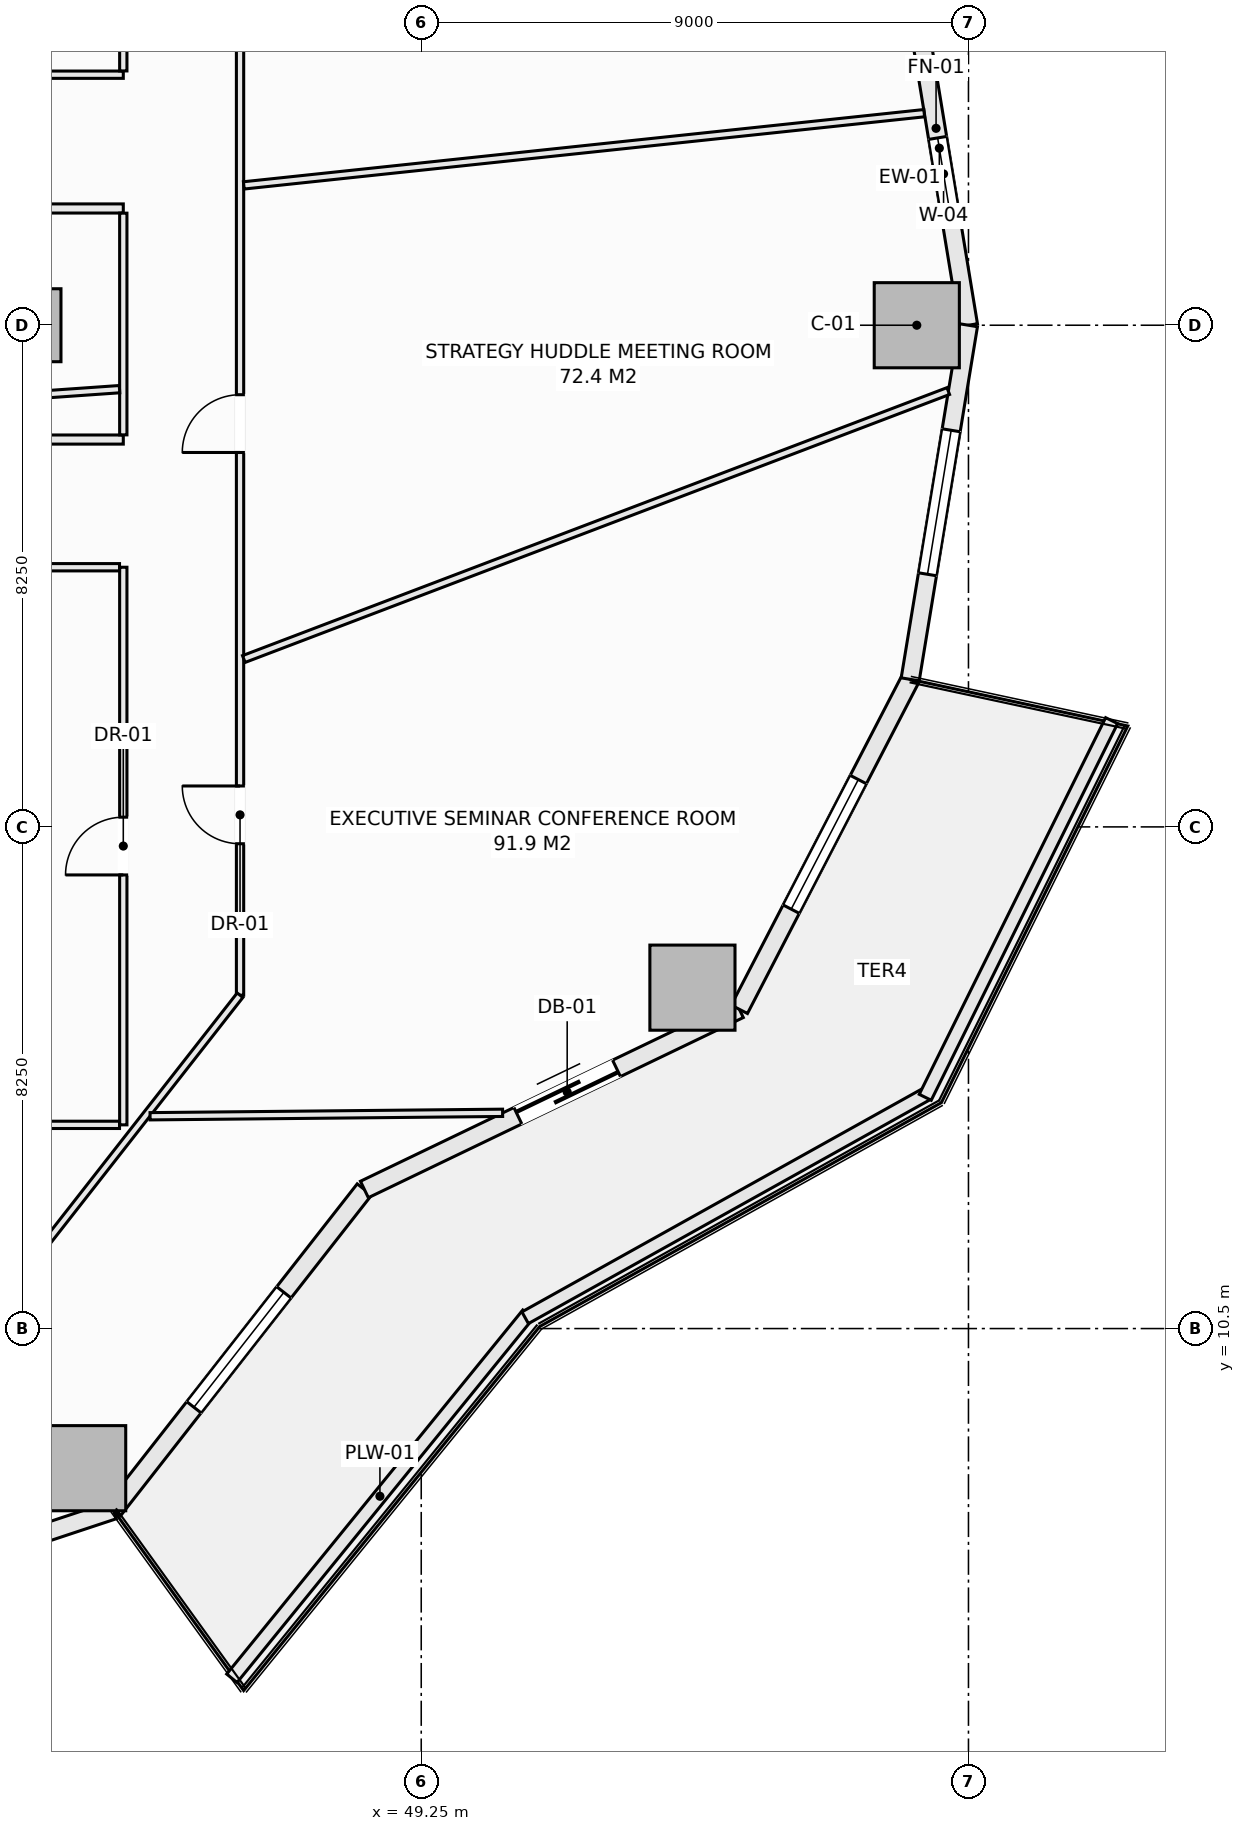
"""IFC4 building model, lengths in metres.
Left out: names, types, materials, properties, quantities, classifications, styles, units other than length and angle.
Written with IfcOpenShell. Run it as: python <this file> out.ifc"""

import sys

from ifc_helpers import new_model, si_unit, direction, frame, frame_2d, origin, origin_2d, place, context, subcontext, project, spatial, rectangle, extrude, element, fill, save


model = new_model("IFC4")
c1 = context("Model", 3, precision=1e-05, world=origin(), true_north=direction((0.0, 1.0)))
c2 = subcontext(c1, "Body", "Model", "MODEL_VIEW")
j1 = project(units=[si_unit("LENGTHUNIT", "METRE"), si_unit("PLANEANGLEUNIT", "RADIAN")], contexts=[c1])
p1 = place(None, origin())
s1 = spatial("IfcSite", under=j1, at=p1, CompositionType="ELEMENT")
p2 = place(p1, origin())
s2 = spatial("IfcBuilding", under=s1, at=p2, CompositionType="ELEMENT")
p3 = place(p2, frame((0.0, 0.0, 41.9)))
s3 = spatial("IfcBuildingStorey", under=s2, at=p3, CompositionType="ELEMENT", Elevation=41.9)
for number, where, z_axis, x_axis in (
    (1, (57.4, 27.0, -0.28), (0.0, 0.0, 1.0), (1.0, 0.0, 0.0)),
    (2, (43.69, 8.204, -0.28), (0.0, 0.0, 1.0), (1.0, 0.0, 0.0)),
    (3, (53.71, 16.106, -0.28), (0.0, 0.0, 1.0), (1.0, 0.0, 0.0)),
):
    element("IfcColumn", number, at=place(p3, frame(where, z_axis=z_axis, x_axis=x_axis)), inside=s3, PredefinedType="COLUMN", context=c2, shape_type="SweptSolid", body=[
        extrude(rectangle(XDim=1.4, YDim=1.4, at=origin_2d()), origin(), (0.0, 0.0, 1.0), 3.85),
    ])
p4 = place(p3, frame((42.725, 27.0, -0.28), z_axis=(0.0, 0.0, 1.0), x_axis=(1.0, 0.0, 0.0)))
e4 = element("IfcColumn", 4, at=p4, inside=s3, PredefinedType="COLUMN", context=c2, shape_type="SweptSolid", body=[
    extrude(rectangle(XDim=1.2, YDim=1.2, at=origin_2d()), origin(), (0.0, 0.0, 1.0), 3.85),
])
p5 = place(p3, frame((57.292, 32.823, 0.0), z_axis=(0.0, 0.0, 1.0), x_axis=(0.162366057843, -0.98673059305, 0.0)))
e5 = element("IfcWall", 5, at=p5, inside=s3, PredefinedType="SOLIDWALL", context=c2, shape_type="SweptSolid", body=[
    extrude(rectangle(XDim=5.902, YDim=0.3, at=frame_2d((2.951, 0.0))), origin(), (0.0, 0.0, 1.0), 3.093),
])
p6 = place(p5, frame((2.78, 0.0, 0.72)))
e6 = element("IfcOpeningElement", 6, at=p6, cuts=e5, PredefinedType="OPENING", context=c2, shape_type="SweptSolid", body=[
    extrude(rectangle(XDim=1.2, YDim=1.65, at=frame_2d((0.6, 0.825))), frame((0.0, 0.16, 0.0), z_axis=(0.0, -1.0, 0.0), x_axis=(1.0, 0.0, 0.0)), (0.0, 0.0, 1.0), 0.32),
])
p7 = place(p3, frame((37.404, 5.267, 0.0), z_axis=(0.0, 0.0, 1.0), x_axis=(0.949238715533, 0.31455661006, 0.0)))
e7 = element("IfcWall", 7, at=p7, inside=s3, PredefinedType="SOLIDWALL", context=c2, shape_type="SweptSolid", body=[
    extrude(rectangle(XDim=7.146, YDim=0.3, at=frame_2d((3.573, 0.0))), origin(), (0.0, 0.0, 1.0), 3.093),
])
p8 = place(p7, frame((2.373, 0.0, 0.85)))
e8 = element("IfcOpeningElement", 8, at=p8, cuts=e7, PredefinedType="OPENING", context=c2, shape_type="SweptSolid", body=[
    extrude(rectangle(XDim=2.4, YDim=1.9, at=frame_2d((1.2, 0.95))), frame((0.0, 0.16, 0.0), z_axis=(0.0, -1.0, 0.0), x_axis=(1.0, 0.0, 0.0)), (0.0, 0.0, 1.0), 0.32),
])
p9 = place(p3, frame((44.188, 7.514, 0.0), z_axis=(0.0, 0.0, 1.0), x_axis=(0.616421309777, 0.787416515482, 0.0)))
e9 = element("IfcWall", 9, at=p9, inside=s3, PredefinedType="SOLIDWALL", context=c2, shape_type="SweptSolid", body=[
    extrude(rectangle(XDim=6.696, YDim=0.3, at=frame_2d((3.348, 0.0))), origin(), (0.0, 0.0, 1.0), 3.093),
])
p10 = place(p9, frame((2.148, 0.0, 0.85)))
e10 = element("IfcOpeningElement", 10, at=p10, cuts=e9, PredefinedType="OPENING", context=c2, shape_type="SweptSolid", body=[
    extrude(rectangle(XDim=2.4, YDim=1.9, at=frame_2d((1.2, 0.95))), frame((0.0, 0.16, 0.0), z_axis=(0.0, -1.0, 0.0), x_axis=(1.0, 0.0, 0.0)), (0.0, 0.0, 1.0), 0.32),
])
p11 = place(p3, frame((48.315, 12.787, 0.0), z_axis=(0.0, 0.0, 1.0), x_axis=(0.901360393999, 0.433069786673, 0.0)))
e11 = element("IfcWall", 11, at=p11, inside=s3, PredefinedType="SOLIDWALL", context=c2, shape_type="SweptSolid", body=[
    extrude(rectangle(XDim=6.842, YDim=0.3, at=frame_2d((3.421, 0.0))), origin(), (0.0, 0.0, 1.0), 3.093),
])
p12 = place(p11, frame((2.8, 0.0, 0.0)))
e12 = element("IfcOpeningElement", 12, at=p12, cuts=e11, PredefinedType="OPENING", context=c2, shape_type="SweptSolid", body=[
    extrude(rectangle(XDim=1.8, YDim=2.25, at=frame_2d((0.9, 1.125))), frame((0.0, 0.16, 0.0), z_axis=(0.0, -1.0, 0.0), x_axis=(1.0, 0.0, 0.0)), (0.0, 0.0, 1.0), 0.32),
])
p13 = place(p3, frame((54.482, 15.75, 0.0), z_axis=(0.0, 0.0, 1.0), x_axis=(0.459809804413, 0.88801742312, 0.0)))
e13 = element("IfcWall", 13, at=p13, inside=s3, PredefinedType="SOLIDWALL", context=c2, shape_type="SweptSolid", body=[
    extrude(rectangle(XDim=6.111, YDim=0.3, at=frame_2d((3.055, 0.0))), origin(), (0.0, 0.0, 1.0), 3.093),
])
p14 = place(p13, frame((1.855, 0.0, 0.85)))
e14 = element("IfcOpeningElement", 14, at=p14, cuts=e13, PredefinedType="OPENING", context=c2, shape_type="SweptSolid", body=[
    extrude(rectangle(XDim=2.4, YDim=1.9, at=frame_2d((1.2, 0.95))), frame((0.0, 0.16, 0.0), z_axis=(0.0, -1.0, 0.0), x_axis=(1.0, 0.0, 0.0)), (0.0, 0.0, 1.0), 0.32),
])
p15 = place(p3, frame((57.292, 21.177, 0.0), z_axis=(0.0, 0.0, 1.0), x_axis=(0.162366057843, 0.98673059305, 0.0)))
e15 = element("IfcWall", 15, at=p15, inside=s3, PredefinedType="SOLIDWALL", context=c2, shape_type="SweptSolid", body=[
    extrude(rectangle(XDim=5.902, YDim=0.3, at=frame_2d((2.951, 0.0))), origin(), (0.0, 0.0, 1.0), 3.093),
])
p16 = place(p15, frame((1.751, 0.0, 0.85)))
e16 = element("IfcOpeningElement", 16, at=p16, cuts=e15, PredefinedType="OPENING", context=c2, shape_type="SweptSolid", body=[
    extrude(rectangle(XDim=2.4, YDim=1.9, at=frame_2d((1.2, 0.95))), frame((0.0, 0.16, 0.0), z_axis=(0.0, -1.0, 0.0), x_axis=(1.0, 0.0, 0.0)), (0.0, 0.0, 1.0), 0.32),
])
p17 = place(p3, frame((46.136, 4.749, 0.0), z_axis=(0.0, 0.0, 1.0), x_axis=(0.630997450658, 0.775784903993, 0.0)))
e17 = element("IfcWall", 17, at=p17, inside=s3, PredefinedType="PARAPET", context=c2, shape_type="SweptSolid", body=[
    extrude(rectangle(XDim=7.718, YDim=0.22, at=frame_2d((3.859, 0.0))), origin(), (0.0, 0.0, 1.0), 0.52),
])
p18 = place(p3, frame((50.959, 10.678, 0.0), z_axis=(0.0, 0.0, 1.0), x_axis=(0.873500119739, 0.48682393205, 0.0)))
e18 = element("IfcWall", 18, at=p18, inside=s3, PredefinedType="PARAPET", context=c2, shape_type="SweptSolid", body=[
    extrude(rectangle(XDim=7.562, YDim=0.22, at=frame_2d((3.781, 0.0))), origin(), (0.0, 0.0, 1.0), 0.52),
])
p19 = place(p3, frame((57.539, 14.303, 0.0), z_axis=(0.0, 0.0, 1.0), x_axis=(0.443578479433, 0.8962355341, 0.0)))
e19 = element("IfcWall", 19, at=p19, inside=s3, PredefinedType="PARAPET", context=c2, shape_type="SweptSolid", body=[
    extrude(rectangle(XDim=6.911, YDim=0.22, at=frame_2d((3.456, 0.0))), origin(), (0.0, 0.0, 1.0), 0.52),
])
p20 = place(p3, frame((29.78, 25.12, 0.0), z_axis=(0.0, 0.0, 1.0), x_axis=(1.0, 0.0, 0.0)))
e20 = element("IfcWall", 20, at=p20, inside=s3, PredefinedType="PARTITIONING", context=c2, shape_type="SweptSolid", body=[
    extrude(rectangle(XDim=14.57, YDim=0.15, at=frame_2d((7.285, 0.0))), origin(), (0.0, 0.0, 1.0), 3.57),
])
p21 = place(p20, frame((3.14, 0.0, 0.0)))
e21 = element("IfcOpeningElement", 21, at=p21, cuts=e20, PredefinedType="OPENING", context=c2, shape_type="SweptSolid", body=[
    extrude(rectangle(XDim=0.95, YDim=2.1, at=frame_2d((0.475, 1.05))), frame((0.0, 0.085, 0.0), z_axis=(0.0, -1.0, 0.0), x_axis=(1.0, 0.0, 0.0)), (0.0, 0.0, 1.0), 0.17),
])
p22 = place(p20, frame((7.445, 0.0, 0.0)))
e22 = element("IfcOpeningElement", 22, at=p22, cuts=e20, PredefinedType="OPENING", context=c2, shape_type="SweptSolid", body=[
    extrude(rectangle(XDim=0.95, YDim=2.1, at=frame_2d((0.475, 1.05))), frame((0.0, 0.085, 0.0), z_axis=(0.0, -1.0, 0.0), x_axis=(1.0, 0.0, 0.0)), (0.0, 0.0, 1.0), 0.17),
])
p23 = place(p3, frame((30.077, 28.92, 0.0), z_axis=(0.0, 0.0, 1.0), x_axis=(1.0, 0.0, 0.0)))
e23 = element("IfcWall", 23, at=p23, inside=s3, PredefinedType="PARTITIONING", context=c2, shape_type="SweptSolid", body=[
    extrude(rectangle(XDim=14.273, YDim=0.15, at=frame_2d((7.137, 0.0))), origin(), (0.0, 0.0, 1.0), 3.57),
])
p24 = place(p23, frame((10.678, 0.0, 0.0)))
e24 = element("IfcOpeningElement", 24, at=p24, cuts=e23, PredefinedType="OPENING", context=c2, shape_type="SweptSolid", body=[
    extrude(rectangle(XDim=0.95, YDim=2.1, at=frame_2d((0.475, 1.05))), frame((0.0, 0.085, 0.0), z_axis=(0.0, -1.0, 0.0), x_axis=(1.0, 0.0, 0.0)), (0.0, 0.0, 1.0), 0.17),
])
p25 = place(p3, frame((39.02, 31.12, 0.0), z_axis=(0.0, 0.0, 1.0), x_axis=(1.0, 0.0, 0.0)))
e25 = element("IfcWall", 25, at=p25, inside=s3, PredefinedType="PARTITIONING", context=c2, shape_type="SweptSolid", body=[
    extrude(rectangle(XDim=5.33, YDim=0.12, at=frame_2d((2.665, 0.0))), origin(), (0.0, 0.0, 1.0), 3.57),
])
p26 = place(p3, frame((44.35, 13.85, 0.0), z_axis=(0.0, 0.0, 1.0), x_axis=(0.0, 1.0, 0.0)))
e26 = element("IfcWall", 26, at=p26, inside=s3, PredefinedType="PARTITIONING", context=c2, shape_type="SweptSolid", body=[
    extrude(rectangle(XDim=9.17, YDim=0.12, at=frame_2d((4.585, 0.0))), origin(), (0.0, 0.0, 1.0), 3.57),
])
p27 = place(p26, frame((4.11, 0.0, 0.0)))
e27 = element("IfcOpeningElement", 27, at=p27, cuts=e26, PredefinedType="OPENING", context=c2, shape_type="SweptSolid", body=[
    extrude(rectangle(XDim=0.95, YDim=2.1, at=frame_2d((0.475, 1.05))), frame((0.0, 0.07, 0.0), z_axis=(0.0, -1.0, 0.0), x_axis=(1.0, 0.0, 0.0)), (0.0, 0.0, 1.0), 0.14),
])
p28 = place(p3, frame((44.35, 25.197, 0.0), z_axis=(0.0, 0.0, 1.0), x_axis=(0.0, 1.0, 0.0)))
e28 = element("IfcWall", 28, at=p28, inside=s3, PredefinedType="PARTITIONING", context=c2, shape_type="SweptSolid", body=[
    extrude(rectangle(XDim=3.646, YDim=0.12, at=frame_2d((1.823, 0.0))), origin(), (0.0, 0.0, 1.0), 3.57),
])
p29 = place(p3, frame((44.35, 31.182, 0.0), z_axis=(0.0, 0.0, 1.0), x_axis=(0.0, 1.0, 0.0)))
e29 = element("IfcWall", 29, at=p29, inside=s3, PredefinedType="PARTITIONING", context=c2, shape_type="SweptSolid", body=[
    extrude(rectangle(XDim=8.918, YDim=0.12, at=frame_2d((4.459, 0.0))), origin(), (0.0, 0.0, 1.0), 3.57),
])
p30 = place(p29, frame((3.984, 0.0, 0.0)))
e30 = element("IfcOpeningElement", 30, at=p30, cuts=e29, PredefinedType="OPENING", context=c2, shape_type="SweptSolid", body=[
    extrude(rectangle(XDim=0.95, YDim=2.1, at=frame_2d((0.475, 1.05))), frame((0.0, 0.07, 0.0), z_axis=(0.0, -1.0, 0.0), x_axis=(1.0, 0.0, 0.0)), (0.0, 0.0, 1.0), 0.14),
])
p31 = place(p3, frame((46.27, 15.982, 0.0), z_axis=(0.0, 0.0, 1.0), x_axis=(0.0, 1.0, 0.0)))
e31 = element("IfcWall", 31, at=p31, inside=s3, PredefinedType="PARTITIONING", context=c2, shape_type="SweptSolid", body=[
    extrude(rectangle(XDim=22.036, YDim=0.12, at=frame_2d((11.018, 0.0))), origin(), (0.0, 0.0, 1.0), 3.57),
])
p32 = place(p31, frame((2.491, 0.0, 0.0)))
e32 = element("IfcOpeningElement", 32, at=p32, cuts=e31, PredefinedType="OPENING", context=c2, shape_type="SweptSolid", body=[
    extrude(rectangle(XDim=0.95, YDim=2.1, at=frame_2d((0.475, 1.05))), frame((0.0, 0.07, 0.0), z_axis=(0.0, -1.0, 0.0), x_axis=(1.0, 0.0, 0.0)), (0.0, 0.0, 1.0), 0.14),
])
p33 = place(p31, frame((8.925, 0.0, 0.0)))
e33 = element("IfcOpeningElement", 33, at=p33, cuts=e31, PredefinedType="OPENING", context=c2, shape_type="SweptSolid", body=[
    extrude(rectangle(XDim=0.95, YDim=2.1, at=frame_2d((0.475, 1.05))), frame((0.0, 0.07, 0.0), z_axis=(0.0, -1.0, 0.0), x_axis=(1.0, 0.0, 0.0)), (0.0, 0.0, 1.0), 0.14),
])
p34 = place(p31, frame((16.993, 0.0, 0.0)))
e34 = element("IfcOpeningElement", 34, at=p34, cuts=e31, PredefinedType="OPENING", context=c2, shape_type="SweptSolid", body=[
    extrude(rectangle(XDim=0.95, YDim=2.1, at=frame_2d((0.475, 1.05))), frame((0.0, 0.07, 0.0), z_axis=(0.0, -1.0, 0.0), x_axis=(1.0, 0.0, 0.0)), (0.0, 0.0, 1.0), 0.14),
])
p35 = place(p3, frame((42.957, 11.75, 0.0), z_axis=(0.0, 0.0, 1.0), x_axis=(0.616428289415, 0.78741105149, 0.0)))
e35 = element("IfcWall", 35, at=p35, inside=s3, PredefinedType="PARTITIONING", context=c2, shape_type="SweptSolid", body=[
    extrude(rectangle(XDim=5.375, YDim=0.12, at=frame_2d((2.687, 0.0))), origin(), (0.0, 0.0, 1.0), 3.57),
])
p36 = place(p3, frame((35.95, 13.85, 0.0), z_axis=(0.0, 0.0, 1.0), x_axis=(1.0, 0.0, 0.0)))
e36 = element("IfcWall", 36, at=p36, inside=s3, PredefinedType="PARTITIONING", context=c2, shape_type="SweptSolid", body=[
    extrude(rectangle(XDim=8.338, YDim=0.12, at=frame_2d((4.169, 0.0))), origin(), (0.0, 0.0, 1.0), 3.57),
])
p37 = place(p3, frame((39.0, 23.02, 0.0), z_axis=(0.0, 0.0, 1.0), x_axis=(1.0, 0.0, 0.0)))
e37 = element("IfcWall", 37, at=p37, inside=s3, PredefinedType="PARTITIONING", context=c2, shape_type="SweptSolid", body=[
    extrude(rectangle(XDim=5.288, YDim=0.12, at=frame_2d((2.644, 0.0))), origin(), (0.0, 0.0, 1.0), 3.57),
])
p38 = place(p3, frame((44.79, 13.991, 0.0), z_axis=(0.0, 0.0, 1.0), x_axis=(0.999951876208, 0.009810467268, 0.0)))
e38 = element("IfcWall", 38, at=p38, inside=s3, PredefinedType="PARTITIONING", context=c2, shape_type="SweptSolid", body=[
    extrude(rectangle(XDim=5.798, YDim=0.12, at=frame_2d((2.899, 0.0))), origin(), (0.0, 0.0, 1.0), 3.205),
])
p39 = place(p3, frame((46.332, 21.51, 0.0), z_axis=(0.0, 0.0, 1.0), x_axis=(0.934671698943, 0.355512046484, 0.0)))
e39 = element("IfcWall", 39, at=p39, inside=s3, PredefinedType="PARTITIONING", context=c2, shape_type="SweptSolid", body=[
    extrude(rectangle(XDim=12.396, YDim=0.12, at=frame_2d((6.198, 0.0))), origin(), (0.0, 0.0, 1.0), 3.205),
])
p40 = place(p3, frame((46.332, 29.3, 0.0), z_axis=(0.0, 0.0, 1.0), x_axis=(0.994414134786, 0.105548702209, 0.0)))
e40 = element("IfcWall", 40, at=p40, inside=s3, PredefinedType="PARTITIONING", context=c2, shape_type="SweptSolid", body=[
    extrude(rectangle(XDim=11.253, YDim=0.12, at=frame_2d((5.626, 0.0))), origin(), (0.0, 0.0, 1.0), 3.57),
])
p41 = place(p3, frame((38.877, 25.57, 0.0), z_axis=(0.0, 0.0, 1.0), x_axis=(0.997563605061, 0.069762840094, 0.0)))
e41 = element("IfcWall", 41, at=p41, inside=s3, PredefinedType="PARTITIONING", context=c2, shape_type="SweptSolid", body=[
    extrude(rectangle(XDim=5.424, YDim=0.12, at=frame_2d((2.712, 0.0))), origin(), (0.0, 0.0, 1.0), 3.57),
])
p42 = place(p6, origin())
e42 = element("IfcWindow", 42, at=p42, inside=s3, PartitioningType="SINGLE_PANEL", PredefinedType="WINDOW", context=c2, shape_type="SweptSolid", body=[
    extrude(rectangle(XDim=1.2, YDim=1.65, at=frame_2d((0.6, 0.825))), frame((0.0, 0.03, 0.0), z_axis=(0.0, -1.0, 0.0), x_axis=(1.0, 0.0, 0.0)), (0.0, 0.0, 1.0), 0.06),
])
fill(e6, e42)
p43 = place(p10, origin())
e43 = element("IfcWindow", 43, at=p43, inside=s3, PartitioningType="SINGLE_PANEL", PredefinedType="WINDOW", context=c2, shape_type="SweptSolid", body=[
    extrude(rectangle(XDim=2.4, YDim=1.9, at=frame_2d((1.2, 0.95))), frame((0.0, 0.03, 0.0), z_axis=(0.0, -1.0, 0.0), x_axis=(1.0, 0.0, 0.0)), (0.0, 0.0, 1.0), 0.06),
])
fill(e10, e43)
p44 = place(p12, frame((1.8, 0.0, 0.0), z_axis=(0.0, 0.0, 1.0), x_axis=(-1.0, 0.0, 0.0)))
e44 = element("IfcDoor", 44, at=p44, inside=s3, OperationType="SLIDING_TO_LEFT", PredefinedType="DOOR", context=c2, shape_type="SweptSolid", body=[
    extrude(rectangle(XDim=1.8, YDim=2.25, at=frame_2d((0.9, 1.125))), frame((0.0, 0.025, 0.0), z_axis=(0.0, -1.0, 0.0), x_axis=(1.0, 0.0, 0.0)), (0.0, 0.0, 1.0), 0.05),
])
fill(e12, e44)
p45 = place(p14, origin())
e45 = element("IfcWindow", 45, at=p45, inside=s3, PartitioningType="SINGLE_PANEL", PredefinedType="WINDOW", context=c2, shape_type="SweptSolid", body=[
    extrude(rectangle(XDim=2.4, YDim=1.9, at=frame_2d((1.2, 0.95))), frame((0.0, 0.03, 0.0), z_axis=(0.0, -1.0, 0.0), x_axis=(1.0, 0.0, 0.0)), (0.0, 0.0, 1.0), 0.06),
])
fill(e14, e45)
p46 = place(p16, origin())
e46 = element("IfcWindow", 46, at=p46, inside=s3, PartitioningType="SINGLE_PANEL", PredefinedType="WINDOW", context=c2, shape_type="SweptSolid", body=[
    extrude(rectangle(XDim=2.4, YDim=1.9, at=frame_2d((1.2, 0.95))), frame((0.0, 0.03, 0.0), z_axis=(0.0, -1.0, 0.0), x_axis=(1.0, 0.0, 0.0)), (0.0, 0.0, 1.0), 0.06),
])
fill(e16, e46)
p47 = place(p27, origin())
e47 = element("IfcDoor", 47, at=p47, inside=s3, OperationType="SINGLE_SWING_LEFT", PredefinedType="DOOR", context=c2, shape_type="SweptSolid", body=[
    extrude(rectangle(XDim=0.95, YDim=2.1, at=frame_2d((0.475, 1.05))), frame((0.0, 0.025, 0.0), z_axis=(0.0, -1.0, 0.0), x_axis=(1.0, 0.0, 0.0)), (0.0, 0.0, 1.0), 0.05),
])
fill(e27, e47)
p48 = place(p32, origin())
e48 = element("IfcDoor", 48, at=p48, inside=s3, OperationType="SINGLE_SWING_RIGHT", PredefinedType="DOOR", context=c2, shape_type="SweptSolid", body=[
    extrude(rectangle(XDim=0.95, YDim=2.1, at=frame_2d((0.475, 1.05))), frame((0.0, 0.025, 0.0), z_axis=(0.0, -1.0, 0.0), x_axis=(1.0, 0.0, 0.0)), (0.0, 0.0, 1.0), 0.05),
])
fill(e32, e48)
p49 = place(p33, origin())
e49 = element("IfcDoor", 49, at=p49, inside=s3, OperationType="SINGLE_SWING_LEFT", PredefinedType="DOOR", context=c2, shape_type="SweptSolid", body=[
    extrude(rectangle(XDim=0.95, YDim=2.1, at=frame_2d((0.475, 1.05))), frame((0.0, 0.025, 0.0), z_axis=(0.0, -1.0, 0.0), x_axis=(1.0, 0.0, 0.0)), (0.0, 0.0, 1.0), 0.05),
])
fill(e33, e49)
save(model, sys.argv[1])
